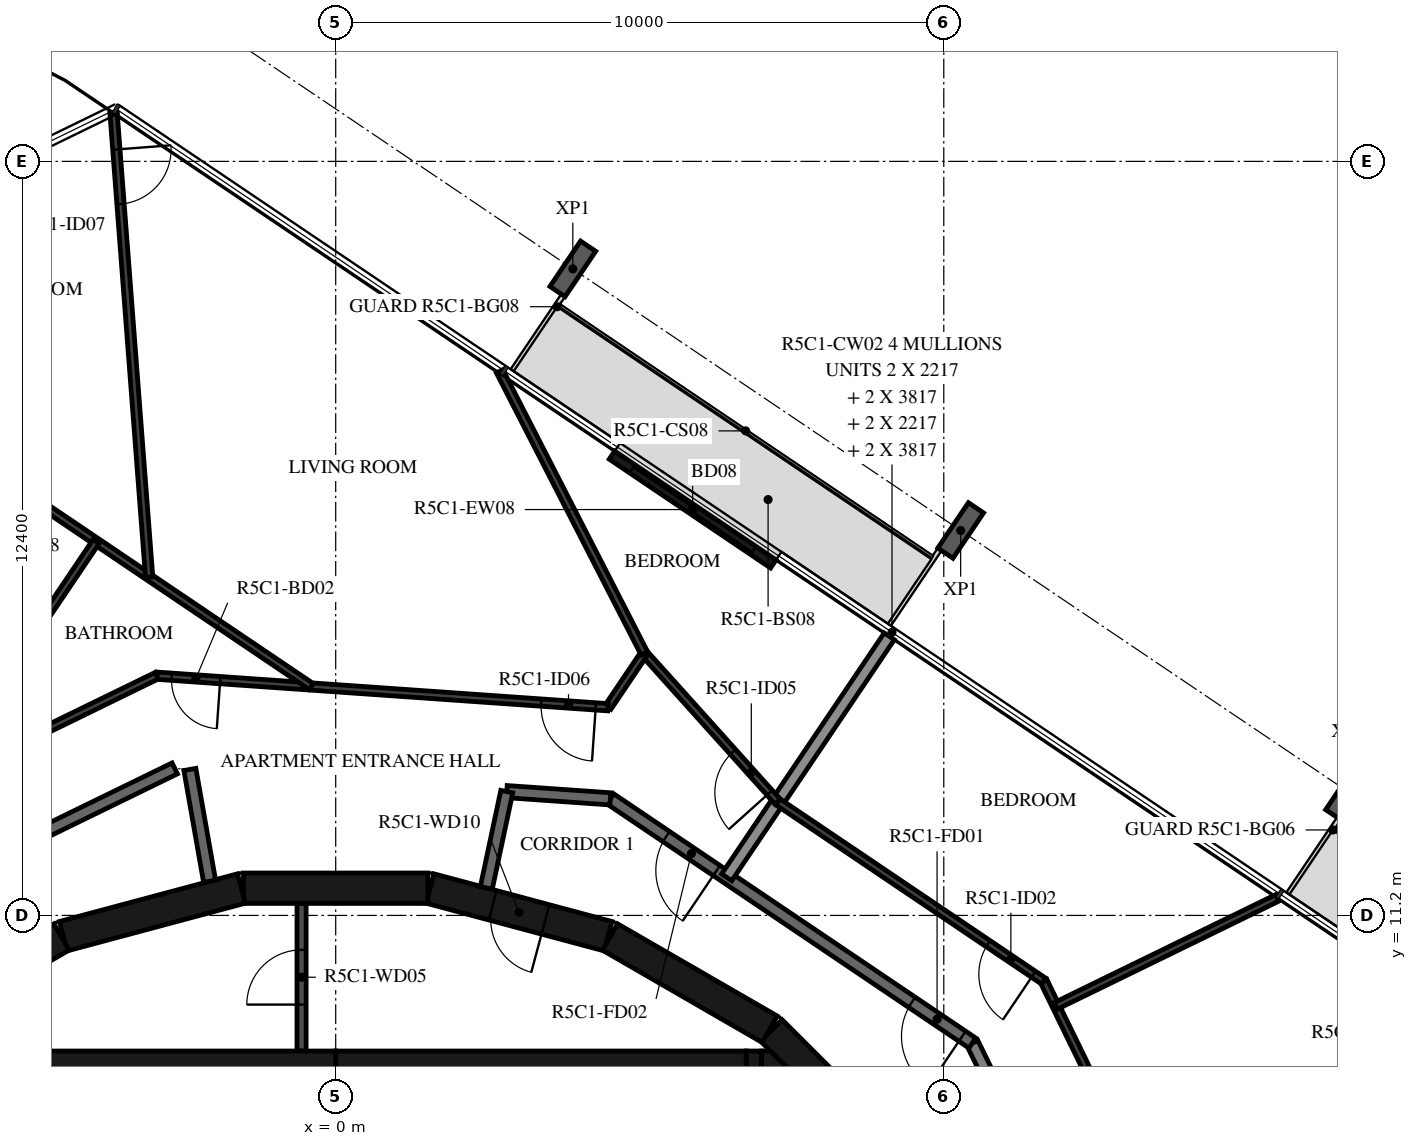
"""IFC4 building model, lengths in metres.
Left out: names, types, materials, properties, quantities, classifications, styles, units other than length and angle.
Written with IfcOpenShell. Run it as: python <this file> out.ifc"""

import sys

from ifc_helpers import new_model, si_unit, direction, frame, frame_2d, origin, origin_2d, place, context, subcontext, project, spatial, polyline, rectangle, i_section, outline, extrude, element, fill, save


model = new_model("IFC4")
c1 = context("Model", 3, precision=1e-05, world=origin(), true_north=direction((0.0, 1.0)))
c2 = subcontext(c1, "Body", "Model", "MODEL_VIEW")
j1 = project(units=[si_unit("LENGTHUNIT", "METRE"), si_unit("PLANEANGLEUNIT", "RADIAN")], contexts=[c1])
p1 = place(None, origin())
s1 = spatial("IfcSite", under=j1, at=p1, CompositionType="ELEMENT")
p2 = place(p1, origin())
s2 = spatial("IfcBuilding", under=s1, at=p2, CompositionType="ELEMENT")
p3 = place(p2, frame((0.0, 0.0, 212.9)))
s3 = spatial("IfcBuildingStorey", under=s2, at=p3, CompositionType="ELEMENT", Elevation=212.9)
for number, where, z_axis, x_axis in (
    (1, (16.656, 13.228, -0.38), (0.0, 0.0, 1.0), (0.829, -0.559, 0.0)),
    (2, (10.278, 17.531, -0.38), (0.0, 0.0, 1.0), (0.829, -0.559, 0.0)),
    (3, (3.899, 21.833, -0.38), (0.0, 0.0, 1.0), (0.829, -0.559, 0.0)),
):
    element("IfcColumn", number, at=place(p3, frame(where, z_axis=z_axis, x_axis=x_axis)), inside=s3, PredefinedType="COLUMN", context=c2, shape_type="SweptSolid", body=[
        extrude(i_section(OverallWidth=0.3, OverallDepth=0.9, WebThickness=0.019, FlangeThickness=0.035, FilletRadius=0.03, at=origin_2d()), origin(), (0.0, 0.0, 1.0), 3.5),
    ])
p4 = place(p3, frame((7.196, 16.98, 0.0), z_axis=(0.0, 0.0, 1.0), x_axis=(-0.829044984211, 0.559181915082, 0.0)))
e4 = element("IfcWall", 4, at=p4, inside=s3, PredefinedType="STANDARD", context=c2, shape_type="SweptSolid", body=[
    extrude(rectangle(XDim=3.2, YDim=0.16, at=frame_2d((1.6, 0.0))), origin(), (0.0, 0.0, 1.0), 3.12),
])
p5 = place(p4, frame((0.4, 0.0, 0.0)))
e5 = element("IfcOpeningElement", 5, at=p5, cuts=e4, PredefinedType="OPENING", context=c2, shape_type="SweptSolid", body=[
    extrude(rectangle(XDim=2.4, YDim=2.4, at=frame_2d((1.2, 1.2))), frame((0.0, 0.09, 0.0), z_axis=(0.0, -1.0, 0.0), x_axis=(1.0, 0.0, 0.0)), (0.0, 0.0, 1.0), 0.18),
])
p6 = place(p3, frame((9.308, 7.164, 0.0), z_axis=(0.0, 0.0, 1.0), x_axis=(-0.707106781187, 0.707106781187, 0.0)))
e6 = element("IfcWall", 6, at=p6, inside=s3, PredefinedType="SHEAR", context=c2, shape_type="SweptSolid", body=[
    extrude(rectangle(XDim=3.032, YDim=0.5, at=frame_2d((1.516, 0.0))), origin(), (0.0, 0.0, 1.0), 3.12),
])
p7 = place(p6, frame((0.416, 0.0, 0.0)))
e7 = element("IfcOpeningElement", 7, at=p7, cuts=e6, PredefinedType="OPENING", context=c2, shape_type="SweptSolid", body=[
    extrude(rectangle(XDim=1.2, YDim=2.1, at=frame_2d((0.6, 1.05))), frame((0.0, 0.26, 0.0), z_axis=(0.0, -1.0, 0.0), x_axis=(1.0, 0.0, 0.0)), (0.0, 0.0, 1.0), 0.52),
])
p8 = place(p3, frame((7.137, 9.329, 0.0), z_axis=(0.0, 0.0, 1.0), x_axis=(-0.865975092491, 0.500087131594, 0.0)))
e8 = element("IfcWall", 8, at=p8, inside=s3, PredefinedType="SHEAR", context=c2, shape_type="SweptSolid", body=[
    extrude(rectangle(XDim=3.033, YDim=0.5, at=frame_2d((1.516, 0.0))), origin(), (0.0, 0.0, 1.0), 3.12),
])
p9 = place(p3, frame((4.479, 10.858, 0.0), z_axis=(0.0, 0.0, 1.0), x_axis=(-0.965948410781, 0.258734743916, 0.0)))
e9 = element("IfcWall", 9, at=p9, inside=s3, PredefinedType="SHEAR", context=c2, shape_type="SweptSolid", body=[
    extrude(rectangle(XDim=3.033, YDim=0.5, at=frame_2d((1.516, 0.0))), origin(), (0.0, 0.0, 1.0), 3.12),
])
p10 = place(p9, frame((1.066, 0.0, 0.0)))
e10 = element("IfcOpeningElement", 10, at=p10, cuts=e9, PredefinedType="OPENING", context=c2, shape_type="SweptSolid", body=[
    extrude(rectangle(XDim=0.9, YDim=2.1, at=frame_2d((0.45, 1.05))), frame((0.0, 0.26, 0.0), z_axis=(0.0, -1.0, 0.0), x_axis=(1.0, 0.0, 0.0)), (0.0, 0.0, 1.0), 0.52),
])
for number, where, z_axis, x_axis in (
    (11, (1.516, 11.647, 0.0), (0.0, 0.0, 1.0), (-1.0, 0.0, 0.0)),
    (12, (-1.55, 11.643, 0.0), (0.0, 0.0, 1.0), (-0.966, -0.259, 0.0)),
    (13, (-4.51, 10.845, 0.0), (0.0, 0.0, 1.0), (-0.866, -0.5, 0.0)),
):
    element("IfcWall", number, at=place(p3, frame(where, z_axis=z_axis, x_axis=x_axis)), inside=s3, PredefinedType="SHEAR", context=c2, shape_type="SweptSolid", body=[
        extrude(rectangle(XDim=3.033, YDim=0.5, at=frame_2d((1.516, 0.0))), origin(), (0.0, 0.0, 1.0), 3.12),
    ])
p11 = place(p3, frame((0.0, 8.82, 0.0), z_axis=(0.0, 0.0, 1.0), x_axis=(1.0, 0.0, 0.0)))
e14 = element("IfcWall", 14, at=p11, inside=s3, PredefinedType="SHEAR", context=c2, shape_type="SweptSolid", body=[
    extrude(rectangle(XDim=6.75, YDim=0.3, at=frame_2d((3.375, 0.0))), origin(), (0.0, 0.0, 1.0), 3.12),
])
p12 = place(p3, frame((6.875, 5.05, 0.0), z_axis=(0.0, 0.0, 1.0), x_axis=(0.0, 1.0, 0.0)))
e15 = element("IfcWall", 15, at=p12, inside=s3, PredefinedType="SHEAR", context=c2, shape_type="SweptSolid", body=[
    extrude(rectangle(XDim=3.92, YDim=0.25, at=frame_2d((1.96, 0.0))), origin(), (0.0, 0.0, 1.0), 3.12),
])
p13 = place(p12, frame((1.11, 0.0, 0.0)))
e16 = element("IfcOpeningElement", 16, at=p13, cuts=e15, PredefinedType="OPENING", context=c2, shape_type="SweptSolid", body=[
    extrude(rectangle(XDim=1.2, YDim=2.1, at=frame_2d((0.6, 1.05))), frame((0.0, 0.135, 0.0), z_axis=(0.0, -1.0, 0.0), x_axis=(1.0, 0.0, 0.0)), (0.0, 0.0, 1.0), 0.27),
])
p14 = place(p3, origin())
e17 = element("IfcWall", 17, at=p14, inside=s3, PredefinedType="SHEAR", context=c2, shape_type="SweptSolid", body=[
    extrude(outline(polyline([(7.448, 8.67), (7.0, 8.67), (7.0, 8.97), (7.148, 8.97), (7.448, 8.67)])), origin(), (0.0, 0.0, 1.0), 3.12),
])
p15 = place(p3, frame((-6.75, 8.82, 0.0), z_axis=(0.0, 0.0, 1.0), x_axis=(1.0, 0.0, 0.0)))
e18 = element("IfcWall", 18, at=p15, inside=s3, PredefinedType="SHEAR", context=c2, shape_type="SweptSolid", body=[
    extrude(rectangle(XDim=6.75, YDim=0.3, at=frame_2d((3.375, 0.0))), origin(), (0.0, 0.0, 1.0), 3.12),
])
p16 = place(p3, frame((-0.562, 8.97, 0.0), z_axis=(0.0, 0.0, 1.0), x_axis=(0.0, 1.0, 0.0)))
e19 = element("IfcWall", 19, at=p16, inside=s3, PredefinedType="PARTITIONING", context=c2, shape_type="SweptSolid", body=[
    extrude(rectangle(XDim=2.427, YDim=0.15, at=frame_2d((1.214, 0.0))), origin(), (0.0, 0.0, 1.0), 3.12),
])
p17 = place(p16, frame((0.764, 0.0, 0.0)))
e20 = element("IfcOpeningElement", 20, at=p17, cuts=e19, PredefinedType="OPENING", context=c2, shape_type="SweptSolid", body=[
    extrude(rectangle(XDim=0.9, YDim=2.1, at=frame_2d((0.45, 1.05))), frame((0.0, 0.085, 0.0), z_axis=(0.0, -1.0, 0.0), x_axis=(1.0, 0.0, 0.0)), (0.0, 0.0, 1.0), 0.17),
])
p18 = place(p3, frame((13.618, 2.647, 0.0), z_axis=(0.0, 0.0, 1.0), x_axis=(-0.438366026218, 0.898796543751, 0.0)))
e21 = element("IfcWall", 21, at=p18, inside=s3, PredefinedType="STANDARD", context=c2, shape_type="SweptSolid", body=[
    extrude(rectangle(XDim=7.181, YDim=0.2, at=frame_2d((3.591, 0.0))), origin(), (0.0, 0.0, 1.0), 3.12),
])
p19 = place(p3, frame((10.47, 9.101, 0.0), z_axis=(0.0, 0.0, 1.0), x_axis=(-0.829035841718, 0.559195469534, 0.0)))
e22 = element("IfcWall", 22, at=p19, inside=s3, PredefinedType="STANDARD", context=c2, shape_type="SweptSolid", body=[
    extrude(rectangle(XDim=7.181, YDim=0.2, at=frame_2d((3.591, 0.0))), origin(), (0.0, 0.0, 1.0), 3.12),
])
p20 = place(p19, frame((0.2, 0.0, 0.0)))
e23 = element("IfcOpeningElement", 23, at=p20, cuts=e22, PredefinedType="OPENING", context=c2, shape_type="SweptSolid", body=[
    extrude(rectangle(XDim=1.0, YDim=2.1, at=frame_2d((0.5, 1.05))), frame((0.0, 0.11, 0.0), z_axis=(0.0, -1.0, 0.0), x_axis=(1.0, 0.0, 0.0)), (0.0, 0.0, 1.0), 0.22),
])
p21 = place(p19, frame((5.073, 0.0, 0.0)))
e24 = element("IfcOpeningElement", 24, at=p21, cuts=e22, PredefinedType="OPENING", context=c2, shape_type="SweptSolid", body=[
    extrude(rectangle(XDim=1.0, YDim=2.1, at=frame_2d((0.5, 1.05))), frame((0.0, 0.11, 0.0), z_axis=(0.0, -1.0, 0.0), x_axis=(1.0, 0.0, 0.0)), (0.0, 0.0, 1.0), 0.22),
])
p22 = place(p3, frame((4.517, 13.117, 0.0), z_axis=(0.0, 0.0, 1.0), x_axis=(-0.997562153664, 0.069783591025, 0.0)))
e25 = element("IfcWall", 25, at=p22, inside=s3, PredefinedType="STANDARD", context=c2, shape_type="SweptSolid", body=[
    extrude(rectangle(XDim=1.707, YDim=0.2, at=frame_2d((0.854, 0.0))), origin(), (0.0, 0.0, 1.0), 3.12),
])
p23 = place(p3, frame((2.813, 13.236, 0.0), z_axis=(0.0, 0.0, 1.0), x_axis=(-0.207911086063, -0.978147729278, 0.0)))
e26 = element("IfcWall", 26, at=p23, inside=s3, PredefinedType="STANDARD", context=c2, shape_type="SweptSolid", body=[
    extrude(rectangle(XDim=1.618, YDim=0.2, at=frame_2d((0.809, 0.0))), origin(), (0.0, 0.0, 1.0), 3.12),
])
p24 = place(p3, frame((-2.074, 11.761, 0.0), z_axis=(0.0, 0.0, 1.0), x_axis=(-0.173740587112, 0.984791454263, 0.0)))
e27 = element("IfcWall", 27, at=p24, inside=s3, PredefinedType="STANDARD", context=c2, shape_type="SweptSolid", body=[
    extrude(rectangle(XDim=1.867, YDim=0.2, at=frame_2d((0.934, 0.0))), origin(), (0.0, 0.0, 1.0), 3.12),
])
p25 = place(p3, frame((-2.647, 13.618, 0.0), z_axis=(0.0, 0.0, 1.0), x_axis=(-0.898796543751, -0.438366026218, 0.0)))
e28 = element("IfcWall", 28, at=p25, inside=s3, PredefinedType="STANDARD", context=c2, shape_type="SweptSolid", body=[
    extrude(rectangle(XDim=7.181, YDim=0.2, at=frame_2d((3.591, 0.0))), origin(), (0.0, 0.0, 1.0), 3.12),
])
p26 = place(p3, frame((9.104, 15.79, 0.0), z_axis=(0.0, 0.0, 1.0), x_axis=(-0.559193912135, -0.829036892201, 0.0)))
e29 = element("IfcWall", 29, at=p26, inside=s3, PredefinedType="STANDARD", context=c2, shape_type="SweptSolid", body=[
    extrude(rectangle(XDim=4.781, YDim=0.2, at=frame_2d((2.39, 0.0))), origin(), (0.0, 0.0, 1.0), 2.73),
])
p27 = place(p3, frame((14.026, 5.232, 0.0), z_axis=(0.0, 0.0, 1.0), x_axis=(-0.438374985284, 0.89879217413, 0.0)))
e30 = element("IfcWall", 30, at=p27, inside=s3, PredefinedType="PARTITIONING", context=c2, shape_type="SweptSolid", body=[
    extrude(rectangle(XDim=5.438, YDim=0.12, at=frame_2d((2.719, 0.0))), origin(), (0.0, 0.0, 1.0), 3.12),
])
p28 = place(p3, frame((11.642, 10.12, 0.0), z_axis=(0.0, 0.0, 1.0), x_axis=(-0.829054664054, 0.559167563446, 0.0)))
e31 = element("IfcWall", 31, at=p28, inside=s3, PredefinedType="PARTITIONING", context=c2, shape_type="SweptSolid", body=[
    extrude(rectangle(XDim=5.275, YDim=0.12, at=frame_2d((2.637, 0.0))), origin(), (0.0, 0.0, 1.0), 3.12),
])
p29 = place(p28, frame((0.2, 0.0, 0.0)))
e32 = element("IfcOpeningElement", 32, at=p29, cuts=e31, PredefinedType="OPENING", context=c2, shape_type="SweptSolid", body=[
    extrude(rectangle(XDim=0.9, YDim=2.1, at=frame_2d((0.45, 1.05))), frame((0.0, 0.07, 0.0), z_axis=(0.0, -1.0, 0.0), x_axis=(1.0, 0.0, 0.0)), (0.0, 0.0, 1.0), 0.14),
])
p30 = place(p3, frame((15.482, 11.487, 0.0), z_axis=(0.0, 0.0, 1.0), x_axis=(-0.898807251285, -0.438344071521, 0.0)))
e33 = element("IfcWall", 33, at=p30, inside=s3, PredefinedType="PARTITIONING", context=c2, shape_type="SweptSolid", body=[
    extrude(rectangle(XDim=4.051, YDim=0.12, at=frame_2d((2.025, 0.0))), origin(), (0.0, 0.0, 1.0), 3.12),
])
p31 = place(p3, frame((7.269, 13.07, 0.0), z_axis=(0.0, 0.0, 1.0), x_axis=(-0.668495993587, 0.743715743116, 0.0)))
e34 = element("IfcWall", 34, at=p31, inside=s3, PredefinedType="PARTITIONING", context=c2, shape_type="SweptSolid", body=[
    extrude(rectangle(XDim=3.281, YDim=0.12, at=frame_2d((1.641, 0.0))), origin(), (0.0, 0.0, 1.0), 3.12),
])
p32 = place(p31, frame((0.2, 0.0, 0.0)))
e35 = element("IfcOpeningElement", 35, at=p32, cuts=e34, PredefinedType="OPENING", context=c2, shape_type="SweptSolid", body=[
    extrude(rectangle(XDim=0.9, YDim=2.1, at=frame_2d((0.45, 1.05))), frame((0.0, 0.07, 0.0), z_axis=(0.0, -1.0, 0.0), x_axis=(1.0, 0.0, 0.0)), (0.0, 0.0, 1.0), 0.14),
])
p33 = place(p3, frame((5.075, 15.51, 0.0), z_axis=(0.0, 0.0, 1.0), x_axis=(-0.559221936342, -0.829017988896, 0.0)))
e36 = element("IfcWall", 36, at=p33, inside=s3, PredefinedType="PARTITIONING", context=c2, shape_type="SweptSolid", body=[
    extrude(rectangle(XDim=1.07, YDim=0.12, at=frame_2d((0.535, 0.0))), origin(), (0.0, 0.0, 1.0), 3.12),
])
p34 = place(p3, frame((4.477, 14.623, 0.0), z_axis=(0.0, 0.0, 1.0), x_axis=(-0.997564862172, 0.069744861884, 0.0)))
e37 = element("IfcWall", 37, at=p34, inside=s3, PredefinedType="PARTITIONING", context=c2, shape_type="SweptSolid", body=[
    extrude(rectangle(XDim=7.438, YDim=0.12, at=frame_2d((3.719, 0.0))), origin(), (0.0, 0.0, 1.0), 3.12),
])
p35 = place(p34, frame((0.2, 0.0, 0.0)))
e38 = element("IfcOpeningElement", 38, at=p35, cuts=e37, PredefinedType="OPENING", context=c2, shape_type="SweptSolid", body=[
    extrude(rectangle(XDim=0.9, YDim=2.1, at=frame_2d((0.45, 1.05))), frame((0.0, 0.07, 0.0), z_axis=(0.0, -1.0, 0.0), x_axis=(1.0, 0.0, 0.0)), (0.0, 0.0, 1.0), 0.14),
])
p36 = place(p34, frame((6.392, 0.0, 0.0)))
e39 = element("IfcOpeningElement", 39, at=p36, cuts=e37, PredefinedType="OPENING", context=c2, shape_type="SweptSolid", body=[
    extrude(rectangle(XDim=0.8, YDim=2.1, at=frame_2d((0.4, 1.05))), frame((0.0, 0.07, 0.0), z_axis=(0.0, -1.0, 0.0), x_axis=(1.0, 0.0, 0.0)), (0.0, 0.0, 1.0), 0.14),
])
p37 = place(p3, frame((-2.943, 15.142, 0.0), z_axis=(0.0, 0.0, 1.0), x_axis=(-0.89881075705, -0.438336883014, 0.0)))
e40 = element("IfcWall", 40, at=p37, inside=s3, PredefinedType="PARTITIONING", context=c2, shape_type="SweptSolid", body=[
    extrude(rectangle(XDim=3.992, YDim=0.12, at=frame_2d((1.996, 0.0))), origin(), (0.0, 0.0, 1.0), 3.12),
])
p38 = place(p3, frame((2.696, 20.148, 0.0), z_axis=(0.0, 0.0, 1.0), x_axis=(0.456387956197, -0.889780890691, 0.0)))
e41 = element("IfcWall", 41, at=p38, inside=s3, PredefinedType="PARTITIONING", context=c2, shape_type="SweptSolid", body=[
    extrude(rectangle(XDim=5.213, YDim=0.12, at=frame_2d((2.606, 0.0))), origin(), (0.0, 0.0, 1.0), 3.12),
])
p39 = place(p3, frame((-7.476, 19.735, 0.0), z_axis=(0.0, 0.0, 1.0), x_axis=(0.829035412992, -0.559196105142, 0.0)))
e42 = element("IfcWall", 42, at=p39, inside=s3, PredefinedType="PARTITIONING", context=c2, shape_type="SweptSolid", body=[
    extrude(rectangle(XDim=8.531, YDim=0.12, at=frame_2d((4.266, 0.0))), origin(), (0.0, 0.0, 1.0), 3.12),
])
p40 = place(p39, frame((2.204, 0.0, 0.0)))
e43 = element("IfcOpeningElement", 43, at=p40, cuts=e42, PredefinedType="OPENING", context=c2, shape_type="SweptSolid", body=[
    extrude(rectangle(XDim=0.9, YDim=2.1, at=frame_2d((0.45, 1.05))), frame((0.0, 0.07, 0.0), z_axis=(0.0, -1.0, 0.0), x_axis=(1.0, 0.0, 0.0)), (0.0, 0.0, 1.0), 0.14),
])
p41 = place(p3, frame((-3.653, 24.394, 0.0), z_axis=(0.0, 0.0, 1.0), x_axis=(0.076513576433, -0.997068539581, 0.0)))
e44 = element("IfcWall", 44, at=p41, inside=s3, PredefinedType="PARTITIONING", context=c2, shape_type="SweptSolid", body=[
    extrude(rectangle(XDim=7.655, YDim=0.12, at=frame_2d((3.827, 0.0))), origin(), (0.0, 0.0, 1.0), 3.12),
])
p42 = place(p41, frame((0.6, 0.0, 0.0)))
e45 = element("IfcOpeningElement", 45, at=p42, cuts=e44, PredefinedType="OPENING", context=c2, shape_type="SweptSolid", body=[
    extrude(rectangle(XDim=0.9, YDim=2.1, at=frame_2d((0.45, 1.05))), frame((0.0, 0.07, 0.0), z_axis=(0.0, -1.0, 0.0), x_axis=(1.0, 0.0, 0.0)), (0.0, 0.0, 1.0), 0.14),
])
p43 = place(p3, frame((-3.939, 17.35, 0.0), z_axis=(0.0, 0.0, 1.0), x_axis=(-0.559193216274, -0.829037361566, 0.0)))
e46 = element("IfcWall", 46, at=p43, inside=s3, PredefinedType="PARTITIONING", context=c2, shape_type="SweptSolid", body=[
    extrude(rectangle(XDim=4.694, YDim=0.12, at=frame_2d((2.347, 0.0))), origin(), (0.0, 0.0, 1.0), 3.12),
])
p44 = place(p5, origin())
e47 = element("IfcDoor", 47, at=p44, inside=s3, OperationType="DOUBLE_DOOR_SLIDING", PredefinedType="DOOR", context=c2, shape_type="SweptSolid", body=[
    extrude(rectangle(XDim=2.4, YDim=2.4, at=frame_2d((1.2, 1.2))), frame((0.0, 0.025, 0.0), z_axis=(0.0, -1.0, 0.0), x_axis=(1.0, 0.0, 0.0)), (0.0, 0.0, 1.0), 0.05),
])
fill(e5, e47)
p45 = place(p17, origin())
e48 = element("IfcDoor", 48, at=p45, inside=s3, OperationType="SINGLE_SWING_LEFT", PredefinedType="DOOR", context=c2, shape_type="SweptSolid", body=[
    extrude(rectangle(XDim=0.9, YDim=2.1, at=frame_2d((0.45, 1.05))), frame((0.0, 0.025, 0.0), z_axis=(0.0, -1.0, 0.0), x_axis=(1.0, 0.0, 0.0)), (0.0, 0.0, 1.0), 0.05),
])
fill(e20, e48)
p46 = place(p10, origin())
e49 = element("IfcDoor", 49, at=p46, inside=s3, OperationType="SINGLE_SWING_RIGHT", PredefinedType="DOOR", context=c2, shape_type="SweptSolid", body=[
    extrude(rectangle(XDim=0.9, YDim=2.1, at=frame_2d((0.45, 1.05))), frame((0.0, 0.025, 0.0), z_axis=(0.0, -1.0, 0.0), x_axis=(1.0, 0.0, 0.0)), (0.0, 0.0, 1.0), 0.05),
])
fill(e10, e49)
p47 = place(p20, origin())
e50 = element("IfcDoor", 50, at=p47, inside=s3, OperationType="SINGLE_SWING_LEFT", PredefinedType="DOOR", context=c2, shape_type="SweptSolid", body=[
    extrude(rectangle(XDim=1.0, YDim=2.1, at=frame_2d((0.5, 1.05))), frame((0.0, 0.025, 0.0), z_axis=(0.0, -1.0, 0.0), x_axis=(1.0, 0.0, 0.0)), (0.0, 0.0, 1.0), 0.05),
])
fill(e23, e50)
p48 = place(p29, origin())
e51 = element("IfcDoor", 51, at=p48, inside=s3, OperationType="SINGLE_SWING_LEFT", PredefinedType="DOOR", context=c2, shape_type="SweptSolid", body=[
    extrude(rectangle(XDim=0.9, YDim=2.1, at=frame_2d((0.45, 1.05))), frame((0.0, 0.025, 0.0), z_axis=(0.0, -1.0, 0.0), x_axis=(1.0, 0.0, 0.0)), (0.0, 0.0, 1.0), 0.05),
])
fill(e32, e51)
p49 = place(p21, origin())
e52 = element("IfcDoor", 52, at=p49, inside=s3, OperationType="SINGLE_SWING_RIGHT", PredefinedType="DOOR", context=c2, shape_type="SweptSolid", body=[
    extrude(rectangle(XDim=1.0, YDim=2.1, at=frame_2d((0.5, 1.05))), frame((0.0, 0.025, 0.0), z_axis=(0.0, -1.0, 0.0), x_axis=(1.0, 0.0, 0.0)), (0.0, 0.0, 1.0), 0.05),
])
fill(e24, e52)
p50 = place(p32, origin())
e53 = element("IfcDoor", 53, at=p50, inside=s3, OperationType="SINGLE_SWING_RIGHT", PredefinedType="DOOR", context=c2, shape_type="SweptSolid", body=[
    extrude(rectangle(XDim=0.9, YDim=2.1, at=frame_2d((0.45, 1.05))), frame((0.0, 0.025, 0.0), z_axis=(0.0, -1.0, 0.0), x_axis=(1.0, 0.0, 0.0)), (0.0, 0.0, 1.0), 0.05),
])
fill(e35, e53)
p51 = place(p35, origin())
e54 = element("IfcDoor", 54, at=p51, inside=s3, OperationType="SINGLE_SWING_RIGHT", PredefinedType="DOOR", context=c2, shape_type="SweptSolid", body=[
    extrude(rectangle(XDim=0.9, YDim=2.1, at=frame_2d((0.45, 1.05))), frame((0.0, 0.025, 0.0), z_axis=(0.0, -1.0, 0.0), x_axis=(1.0, 0.0, 0.0)), (0.0, 0.0, 1.0), 0.05),
])
fill(e38, e54)
p52 = place(p36, origin())
e55 = element("IfcDoor", 55, at=p52, inside=s3, OperationType="SINGLE_SWING_RIGHT", PredefinedType="DOOR", context=c2, shape_type="SweptSolid", body=[
    extrude(rectangle(XDim=0.8, YDim=2.1, at=frame_2d((0.4, 1.05))), frame((0.0, 0.025, 0.0), z_axis=(0.0, -1.0, 0.0), x_axis=(1.0, 0.0, 0.0)), (0.0, 0.0, 1.0), 0.05),
])
fill(e39, e55)
p53 = place(p42, origin())
e56 = element("IfcDoor", 56, at=p53, inside=s3, OperationType="SINGLE_SWING_RIGHT", PredefinedType="DOOR", context=c2, shape_type="SweptSolid", body=[
    extrude(rectangle(XDim=0.9, YDim=2.1, at=frame_2d((0.45, 1.05))), frame((0.0, 0.025, 0.0), z_axis=(0.0, -1.0, 0.0), x_axis=(1.0, 0.0, 0.0)), (0.0, 0.0, 1.0), 0.05),
])
fill(e45, e56)
save(model, sys.argv[1])
